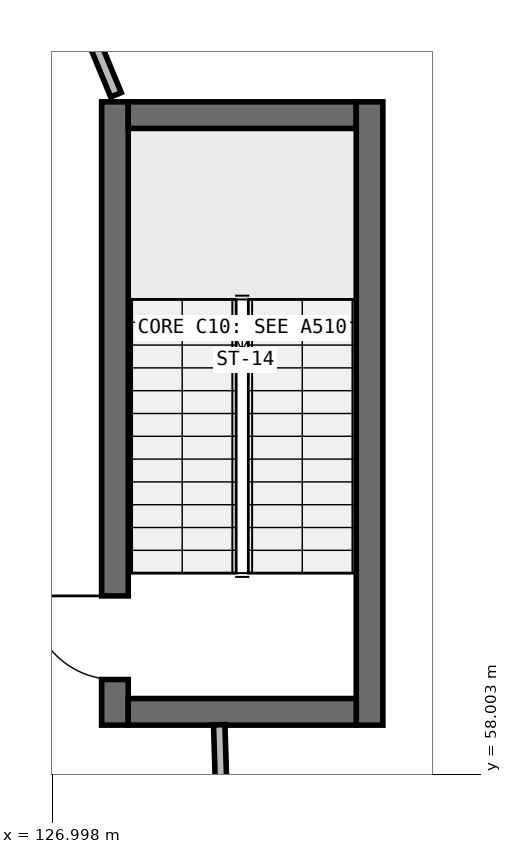
"""IFC4 building model, lengths in metres.
Left out: names, types, materials, properties, quantities, classifications, styles, units other than length and angle.
Written with IfcOpenShell. Run it as: python <this file> out.ifc"""

import sys

from ifc_helpers import new_model, si_unit, direction, frame, frame_2d, origin, place, context, subcontext, project, spatial, rectangle, extrude, element, fill, save


model = new_model("IFC4")
c1 = context("Model", 3, precision=1e-05, world=origin(), true_north=direction((0.0, 1.0)))
c2 = subcontext(c1, "Body", "Model", "MODEL_VIEW")
j1 = project(units=[si_unit("LENGTHUNIT", "METRE"), si_unit("PLANEANGLEUNIT", "RADIAN")], contexts=[c1])
p1 = place(None, origin())
s1 = spatial("IfcSite", under=j1, at=p1, CompositionType="ELEMENT")
p2 = place(p1, origin())
s2 = spatial("IfcBuilding", under=s1, at=p2, CompositionType="ELEMENT")
p3 = place(p2, frame((0.0, 0.0, 18.9)))
s3 = spatial("IfcBuildingStorey", under=s2, at=p3, CompositionType="ELEMENT", Elevation=18.9)
p4 = place(p3, frame((127.825, 58.65, 0.0), z_axis=(0.0, 0.0, 1.0), x_axis=(0.0, 1.0, 0.0)))
e1 = element("IfcWall", 1, at=p4, inside=s3, PredefinedType="SHEAR", context=c2, shape_type="SweptSolid", body=[
    extrude(rectangle(XDim=8.2, YDim=0.35, at=frame_2d((4.1, 0.0))), origin(), (0.0, 0.0, 1.0), 4.55),
])
p5 = place(p4, frame((0.6, 0.0, 0.0)))
e2 = element("IfcOpeningElement", 2, at=p5, cuts=e1, PredefinedType="OPENING", context=c2, shape_type="SweptSolid", body=[
    extrude(rectangle(XDim=1.1, YDim=2.15, at=frame_2d((0.55, 1.075))), frame((0.0, 0.185, 0.0), z_axis=(0.0, -1.0, 0.0), x_axis=(1.0, 0.0, 0.0)), (0.0, 0.0, 1.0), 0.37),
])
p6 = place(p3, frame((128.0, 66.675, 0.0), z_axis=(0.0, 0.0, 1.0), x_axis=(1.0, 0.0, 0.0)))
e3 = element("IfcWall", 3, at=p6, inside=s3, PredefinedType="SHEAR", context=c2, shape_type="SweptSolid", body=[
    extrude(rectangle(XDim=3.0, YDim=0.35, at=frame_2d((1.5, 0.0))), origin(), (0.0, 0.0, 1.0), 4.55),
])
p7 = place(p3, frame((131.175, 66.85, 0.0), z_axis=(0.0, 0.0, 1.0), x_axis=(0.0, -1.0, 0.0)))
e4 = element("IfcWall", 4, at=p7, inside=s3, PredefinedType="SHEAR", context=c2, shape_type="SweptSolid", body=[
    extrude(rectangle(XDim=8.2, YDim=0.35, at=frame_2d((4.1, 0.0))), origin(), (0.0, 0.0, 1.0), 4.55),
])
p8 = place(p3, frame((131.0, 58.825, 0.0), z_axis=(0.0, 0.0, 1.0), x_axis=(-1.0, 0.0, 0.0)))
e5 = element("IfcWall", 5, at=p8, inside=s3, PredefinedType="SHEAR", context=c2, shape_type="SweptSolid", body=[
    extrude(rectangle(XDim=3.0, YDim=0.35, at=frame_2d((1.5, 0.0))), origin(), (0.0, 0.0, 1.0), 4.55),
])
p9 = place(p3, frame((129.28, 56.0, 0.0), z_axis=(0.0, 0.0, 1.0), x_axis=(-0.031249099163, 0.999511627647, 0.0)))
e6 = element("IfcWall", 6, at=p9, inside=s3, PredefinedType="PARTITIONING", context=c2, shape_type="SweptSolid", body=[
    extrude(rectangle(XDim=2.656, YDim=0.15, at=frame_2d((1.328, 0.0))), origin(), (0.0, 0.0, 1.0), 4.3),
])
p10 = place(p3, frame((127.839, 66.943, 0.0), z_axis=(0.0, 0.0, 1.0), x_axis=(-0.382644845446, 0.923895514793, 0.0)))
e7 = element("IfcWall", 7, at=p10, inside=s3, PredefinedType="PARTITIONING", context=c2, shape_type="SweptSolid", body=[
    extrude(rectangle(XDim=11.037, YDim=0.15, at=frame_2d((5.518, 0.0))), origin(), (0.0, 0.0, 1.0), 3.676),
])
p11 = place(p10, frame((4.95, 0.0, 0.0)))
e8 = element("IfcOpeningElement", 8, at=p11, cuts=e7, PredefinedType="OPENING", context=c2, shape_type="SweptSolid", body=[
    extrude(rectangle(XDim=1.1, YDim=2.2, at=frame_2d((0.55, 1.1))), frame((0.0, 0.085, 0.0), z_axis=(0.0, -1.0, 0.0), x_axis=(1.0, 0.0, 0.0)), (0.0, 0.0, 1.0), 0.17),
])
p12 = place(p5, origin())
e9 = element("IfcDoor", 9, at=p12, inside=s3, OperationType="SINGLE_SWING_RIGHT", PredefinedType="DOOR", context=c2, shape_type="SweptSolid", body=[
    extrude(rectangle(XDim=1.1, YDim=2.15, at=frame_2d((0.55, 1.075))), frame((0.0, 0.025, 0.0), z_axis=(0.0, -1.0, 0.0), x_axis=(1.0, 0.0, 0.0)), (0.0, 0.0, 1.0), 0.05),
])
fill(e2, e9)
save(model, sys.argv[1])
